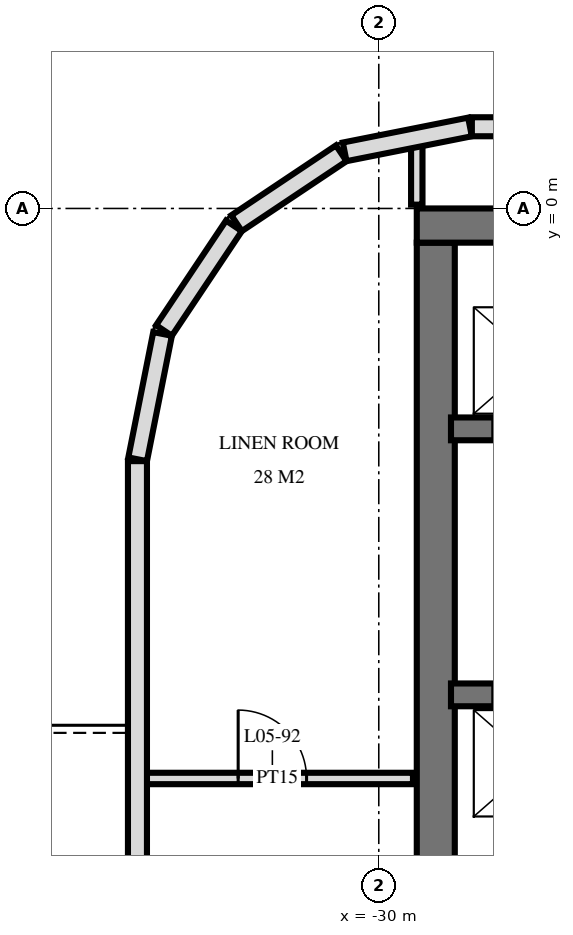
"""IFC4 building model, lengths in metres.
Left out: names, types, materials, properties, quantities, classifications, styles, units other than length and angle.
Written with IfcOpenShell. Run it as: python <this file> out.ifc"""

import sys

from ifc_helpers import new_model, si_unit, direction, frame, frame_2d, origin, place, context, subcontext, project, spatial, rectangle, extrude, element, fill, save


model = new_model("IFC4")
c1 = context("Model", 3, precision=1e-05, world=origin(), true_north=direction((0.0, 1.0)))
c2 = subcontext(c1, "Body", "Model", "MODEL_VIEW")
j1 = project(units=[si_unit("LENGTHUNIT", "METRE"), si_unit("PLANEANGLEUNIT", "RADIAN")], contexts=[c1])
p1 = place(None, origin())
s1 = spatial("IfcSite", under=j1, at=p1, CompositionType="ELEMENT")
p2 = place(p1, origin())
s2 = spatial("IfcBuilding", under=s1, at=p2, CompositionType="ELEMENT")
p3 = place(p2, frame((0.0, 0.0, 27.6)))
s3 = spatial("IfcBuildingStorey", under=s2, at=p3, CompositionType="ELEMENT", Elevation=27.6)
p4 = place(p3, frame((-29.5, -0.225, 0.0), z_axis=(0.0, 0.0, 1.0), x_axis=(1.0, 0.0, 0.0)))
e1 = element("IfcWall", 1, at=p4, inside=s3, PredefinedType="SHEAR", context=c2, shape_type="SweptSolid", body=[
    extrude(rectangle(XDim=19.5, YDim=0.45, at=frame_2d((9.75, 0.0))), origin(), (0.0, 0.0, 1.0), 3.6),
])
p5 = place(p3, frame((-29.25, -14.55, 0.0), z_axis=(0.0, 0.0, 1.0), x_axis=(0.0, 1.0, 0.0)))
e2 = element("IfcWall", 2, at=p5, inside=s3, PredefinedType="SHEAR", context=c2, shape_type="SweptSolid", body=[
    extrude(rectangle(XDim=14.1, YDim=0.5, at=frame_2d((7.05, 0.0))), origin(), (0.0, 0.0, 1.0), 3.6),
])
p6 = place(p3, frame((-29.05, -2.9, 0.0), z_axis=(0.0, 0.0, 1.0), x_axis=(1.0, 0.0, 0.0)))
e3 = element("IfcWall", 3, at=p6, inside=s3, PredefinedType="SHEAR", context=c2, shape_type="SweptSolid", body=[
    extrude(rectangle(XDim=18.7, YDim=0.3, at=frame_2d((9.35, 0.0))), origin(), (0.0, 0.0, 1.0), 3.6),
])
p7 = place(p6, frame((2.95, 0.0, 0.0)))
e4 = element("IfcOpeningElement", 4, at=p7, cuts=e3, PredefinedType="OPENING", context=c2, shape_type="SweptSolid", body=[
    extrude(rectangle(XDim=1.1, YDim=2.1, at=frame_2d((0.55, 1.05))), frame((0.0, 0.16, 0.0), z_axis=(0.0, -1.0, 0.0), x_axis=(1.0, 0.0, 0.0)), (0.0, 0.0, 1.0), 0.32),
])
p8 = place(p6, frame((0.55, 0.0, 0.0)))
e5 = element("IfcOpeningElement", 5, at=p8, cuts=e3, PredefinedType="OPENING", context=c2, shape_type="SweptSolid", body=[
    extrude(rectangle(XDim=1.1, YDim=2.1, at=frame_2d((0.55, 1.05))), frame((0.0, 0.16, 0.0), z_axis=(0.0, -1.0, 0.0), x_axis=(1.0, 0.0, 0.0)), (0.0, 0.0, 1.0), 0.32),
])
p9 = place(p6, frame((11.613, 0.0, 0.0)))
e6 = element("IfcOpeningElement", 6, at=p9, cuts=e3, PredefinedType="OPENING", context=c2, shape_type="SweptSolid", body=[
    extrude(rectangle(XDim=0.9, YDim=2.1, at=frame_2d((0.45, 1.05))), frame((0.0, 0.16, 0.0), z_axis=(0.0, -1.0, 0.0), x_axis=(1.0, 0.0, 0.0)), (0.0, 0.0, 1.0), 0.32),
])
p10 = place(p6, frame((10.188, 0.0, 0.0)))
e7 = element("IfcOpeningElement", 7, at=p10, cuts=e3, PredefinedType="OPENING", context=c2, shape_type="SweptSolid", body=[
    extrude(rectangle(XDim=0.9, YDim=2.1, at=frame_2d((0.45, 1.05))), frame((0.0, 0.16, 0.0), z_axis=(0.0, -1.0, 0.0), x_axis=(1.0, 0.0, 0.0)), (0.0, 0.0, 1.0), 0.32),
])
p11 = place(p6, frame((17.562, 0.0, 0.0)))
e8 = element("IfcOpeningElement", 8, at=p11, cuts=e3, PredefinedType="OPENING", context=c2, shape_type="SweptSolid", body=[
    extrude(rectangle(XDim=1.0, YDim=2.1, at=frame_2d((0.5, 1.05))), frame((0.0, 0.16, 0.0), z_axis=(0.0, -1.0, 0.0), x_axis=(1.0, 0.0, 0.0)), (0.0, 0.0, 1.0), 0.32),
])
p12 = place(p6, frame((16.137, 0.0, 0.0)))
e9 = element("IfcOpeningElement", 9, at=p12, cuts=e3, PredefinedType="OPENING", context=c2, shape_type="SweptSolid", body=[
    extrude(rectangle(XDim=1.0, YDim=2.1, at=frame_2d((0.5, 1.05))), frame((0.0, 0.16, 0.0), z_axis=(0.0, -1.0, 0.0), x_axis=(1.0, 0.0, 0.0)), (0.0, 0.0, 1.0), 0.32),
])
p13 = place(p6, frame((13.85, 0.0, 0.0)))
e10 = element("IfcOpeningElement", 10, at=p13, cuts=e3, PredefinedType="OPENING", context=c2, shape_type="SweptSolid", body=[
    extrude(rectangle(XDim=1.0, YDim=2.1, at=frame_2d((0.5, 1.05))), frame((0.0, 0.16, 0.0), z_axis=(0.0, -1.0, 0.0), x_axis=(1.0, 0.0, 0.0)), (0.0, 0.0, 1.0), 0.32),
])
p14 = place(p6, frame((5.6, 0.0, 0.0)))
e11 = element("IfcOpeningElement", 11, at=p14, cuts=e3, PredefinedType="OPENING", context=c2, shape_type="SweptSolid", body=[
    extrude(rectangle(XDim=1.0, YDim=2.1, at=frame_2d((0.5, 1.05))), frame((0.0, 0.16, 0.0), z_axis=(0.0, -1.0, 0.0), x_axis=(1.0, 0.0, 0.0)), (0.0, 0.0, 1.0), 0.32),
])
p15 = place(p3, frame((-29.05, -6.4, 0.0), z_axis=(0.0, 0.0, 1.0), x_axis=(1.0, 0.0, 0.0)))
e12 = element("IfcWall", 12, at=p15, inside=s3, PredefinedType="SHEAR", context=c2, shape_type="SweptSolid", body=[
    extrude(rectangle(XDim=18.7, YDim=0.3, at=frame_2d((9.35, 0.0))), origin(), (0.0, 0.0, 1.0), 3.6),
])
p16 = place(p15, frame((2.95, 0.0, 0.0)))
e13 = element("IfcOpeningElement", 13, at=p16, cuts=e12, PredefinedType="OPENING", context=c2, shape_type="SweptSolid", body=[
    extrude(rectangle(XDim=1.1, YDim=2.1, at=frame_2d((0.55, 1.05))), frame((0.0, 0.16, 0.0), z_axis=(0.0, -1.0, 0.0), x_axis=(1.0, 0.0, 0.0)), (0.0, 0.0, 1.0), 0.32),
])
p17 = place(p15, frame((0.55, 0.0, 0.0)))
e14 = element("IfcOpeningElement", 14, at=p17, cuts=e12, PredefinedType="OPENING", context=c2, shape_type="SweptSolid", body=[
    extrude(rectangle(XDim=1.1, YDim=2.1, at=frame_2d((0.55, 1.05))), frame((0.0, 0.16, 0.0), z_axis=(0.0, -1.0, 0.0), x_axis=(1.0, 0.0, 0.0)), (0.0, 0.0, 1.0), 0.32),
])
p18 = place(p15, frame((10.8, 0.0, 0.0)))
e15 = element("IfcOpeningElement", 15, at=p18, cuts=e12, PredefinedType="OPENING", context=c2, shape_type="SweptSolid", body=[
    extrude(rectangle(XDim=1.1, YDim=2.1, at=frame_2d((0.55, 1.05))), frame((0.0, 0.16, 0.0), z_axis=(0.0, -1.0, 0.0), x_axis=(1.0, 0.0, 0.0)), (0.0, 0.0, 1.0), 0.32),
])
p19 = place(p15, frame((5.6, 0.0, 0.0)))
e16 = element("IfcOpeningElement", 16, at=p19, cuts=e12, PredefinedType="OPENING", context=c2, shape_type="SweptSolid", body=[
    extrude(rectangle(XDim=1.0, YDim=2.1, at=frame_2d((0.5, 1.05))), frame((0.0, 0.16, 0.0), z_axis=(0.0, -1.0, 0.0), x_axis=(1.0, 0.0, 0.0)), (0.0, 0.0, 1.0), 0.32),
])
p20 = place(p3, frame((28.775, 1.075, 0.0), z_axis=(0.0, 0.0, 1.0), x_axis=(-1.0, 0.0, 0.0)))
e17 = element("IfcWall", 17, at=p20, inside=s3, PredefinedType="SOLIDWALL", context=c2, shape_type="SweptSolid", body=[
    extrude(rectangle(XDim=57.551, YDim=0.25, at=frame_2d((28.775, 0.0))), origin(), (0.0, 0.0, 1.0), 3.32),
])
p21 = place(p20, frame((21.275, 0.0, 0.3)))
e18 = element("IfcOpeningElement", 18, at=p21, cuts=e17, PredefinedType="OPENING", context=c2, shape_type="SweptSolid", body=[
    extrude(rectangle(XDim=2.4, YDim=2.1, at=frame_2d((1.2, 1.05))), frame((0.0, 0.135, 0.0), z_axis=(0.0, -1.0, 0.0), x_axis=(1.0, 0.0, 0.0)), (0.0, 0.0, 1.0), 0.27),
])
p22 = place(p20, frame((27.275, 0.0, 0.3)))
e19 = element("IfcOpeningElement", 19, at=p22, cuts=e17, PredefinedType="OPENING", context=c2, shape_type="SweptSolid", body=[
    extrude(rectangle(XDim=2.4, YDim=2.1, at=frame_2d((1.2, 1.05))), frame((0.0, 0.135, 0.0), z_axis=(0.0, -1.0, 0.0), x_axis=(1.0, 0.0, 0.0)), (0.0, 0.0, 1.0), 0.27),
])
p23 = place(p20, frame((30.275, 0.0, 0.3)))
e20 = element("IfcOpeningElement", 20, at=p23, cuts=e17, PredefinedType="OPENING", context=c2, shape_type="SweptSolid", body=[
    extrude(rectangle(XDim=2.4, YDim=2.1, at=frame_2d((1.2, 1.05))), frame((0.0, 0.135, 0.0), z_axis=(0.0, -1.0, 0.0), x_axis=(1.0, 0.0, 0.0)), (0.0, 0.0, 1.0), 0.27),
])
p24 = place(p3, frame((-28.8, 1.073, 0.0), z_axis=(0.0, 0.0, 1.0), x_axis=(-0.980803419081, -0.194999110559, 0.0)))
e21 = element("IfcWall", 21, at=p24, inside=s3, PredefinedType="SOLIDWALL", context=c2, shape_type="SweptSolid", body=[
    extrude(rectangle(XDim=1.681, YDim=0.25, at=frame_2d((0.841, 0.0))), origin(), (0.0, 0.0, 1.0), 3.32),
])
for number, where, z_axis, x_axis in (
    (22, (-30.494, 0.726, 0.0), (0.0, 0.0, 1.0), (-0.831, -0.556, 0.0)),
    (23, (-31.906, -0.229, 0.0), (0.0, 0.0, 1.0), (-0.556, -0.831, 0.0)),
):
    element("IfcWall", number, at=place(p3, frame(where, z_axis=z_axis, x_axis=x_axis)), inside=s3, PredefinedType="SOLIDWALL", context=c2, shape_type="SweptSolid", body=[
        extrude(rectangle(XDim=1.656, YDim=0.25, at=frame_2d((0.828, 0.0))), origin(), (0.0, 0.0, 1.0), 3.32),
    ])
p25 = place(p3, frame((-32.844, -1.651, 0.0), z_axis=(0.0, 0.0, 1.0), x_axis=(-0.19513878023, -0.980775640221, 0.0)))
e24 = element("IfcWall", 24, at=p25, inside=s3, PredefinedType="SOLIDWALL", context=c2, shape_type="SweptSolid", body=[
    extrude(rectangle(XDim=1.681, YDim=0.25, at=frame_2d((0.841, 0.0))), origin(), (0.0, 0.0, 1.0), 3.32),
])
p26 = place(p3, frame((-33.175, -3.325, 0.0), z_axis=(0.0, 0.0, 1.0), x_axis=(0.0, -1.0, 0.0)))
e25 = element("IfcWall", 25, at=p26, inside=s3, PredefinedType="SOLIDWALL", context=c2, shape_type="SweptSolid", body=[
    extrude(rectangle(XDim=21.551, YDim=0.25, at=frame_2d((10.775, 0.0))), origin(), (0.0, 0.0, 1.0), 3.32),
])
p27 = place(p26, frame((7.025, 0.0, 0.0)))
e26 = element("IfcOpeningElement", 26, at=p27, cuts=e25, PredefinedType="OPENING", context=c2, shape_type="SweptSolid", body=[
    extrude(rectangle(XDim=1.8, YDim=2.4, at=frame_2d((0.9, 1.2))), frame((0.0, 0.135, 0.0), z_axis=(0.0, -1.0, 0.0), x_axis=(1.0, 0.0, 0.0)), (0.0, 0.0, 1.0), 0.27),
])
p28 = place(p26, frame((14.225, 0.0, 0.0)))
e27 = element("IfcOpeningElement", 27, at=p28, cuts=e25, PredefinedType="OPENING", context=c2, shape_type="SweptSolid", body=[
    extrude(rectangle(XDim=1.8, YDim=2.4, at=frame_2d((0.9, 1.2))), frame((0.0, 0.135, 0.0), z_axis=(0.0, -1.0, 0.0), x_axis=(1.0, 0.0, 0.0)), (0.0, 0.0, 1.0), 0.27),
])
p29 = place(p26, frame((18.875, 0.0, 0.0)))
e28 = element("IfcOpeningElement", 28, at=p29, cuts=e25, PredefinedType="OPENING", context=c2, shape_type="SweptSolid", body=[
    extrude(rectangle(XDim=1.8, YDim=2.4, at=frame_2d((0.9, 1.2))), frame((0.0, 0.135, 0.0), z_axis=(0.0, -1.0, 0.0), x_axis=(1.0, 0.0, 0.0)), (0.0, 0.0, 1.0), 0.27),
])
p30 = place(p3, frame((-29.5, 0.05, 0.0), z_axis=(0.0, 0.0, 1.0), x_axis=(0.0, 1.0, 0.0)))
e29 = element("IfcWall", 29, at=p30, inside=s3, PredefinedType="PARTITIONING", context=c2, shape_type="SweptSolid", body=[
    extrude(rectangle(XDim=0.827, YDim=0.15, at=frame_2d((0.414, 0.0))), origin(), (0.0, 0.0, 1.0), 3.32),
])
p31 = place(p3, frame((-33.12, -7.5, 0.0), z_axis=(0.0, 0.0, 1.0), x_axis=(1.0, 0.0, 0.0)))
e30 = element("IfcWall", 30, at=p31, inside=s3, PredefinedType="PARTITIONING", context=c2, shape_type="SweptSolid", body=[
    extrude(rectangle(XDim=3.57, YDim=0.15, at=frame_2d((1.785, 0.0))), origin(), (0.0, 0.0, 1.0), 3.32),
])
p32 = place(p31, frame((1.27, 0.0, 0.0)))
e31 = element("IfcOpeningElement", 31, at=p32, cuts=e30, PredefinedType="OPENING", context=c2, shape_type="SweptSolid", body=[
    extrude(rectangle(XDim=0.9, YDim=2.1, at=frame_2d((0.45, 1.05))), frame((0.0, 0.085, 0.0), z_axis=(0.0, -1.0, 0.0), x_axis=(1.0, 0.0, 0.0)), (0.0, 0.0, 1.0), 0.17),
])
p33 = place(p32, origin())
e32 = element("IfcDoor", 32, at=p33, inside=s3, OperationType="SINGLE_SWING_RIGHT", PredefinedType="DOOR", context=c2, shape_type="SweptSolid", body=[
    extrude(rectangle(XDim=0.9, YDim=2.1, at=frame_2d((0.45, 1.05))), frame((0.0, 0.025, 0.0), z_axis=(0.0, -1.0, 0.0), x_axis=(1.0, 0.0, 0.0)), (0.0, 0.0, 1.0), 0.05),
])
fill(e31, e32)
save(model, sys.argv[1])
